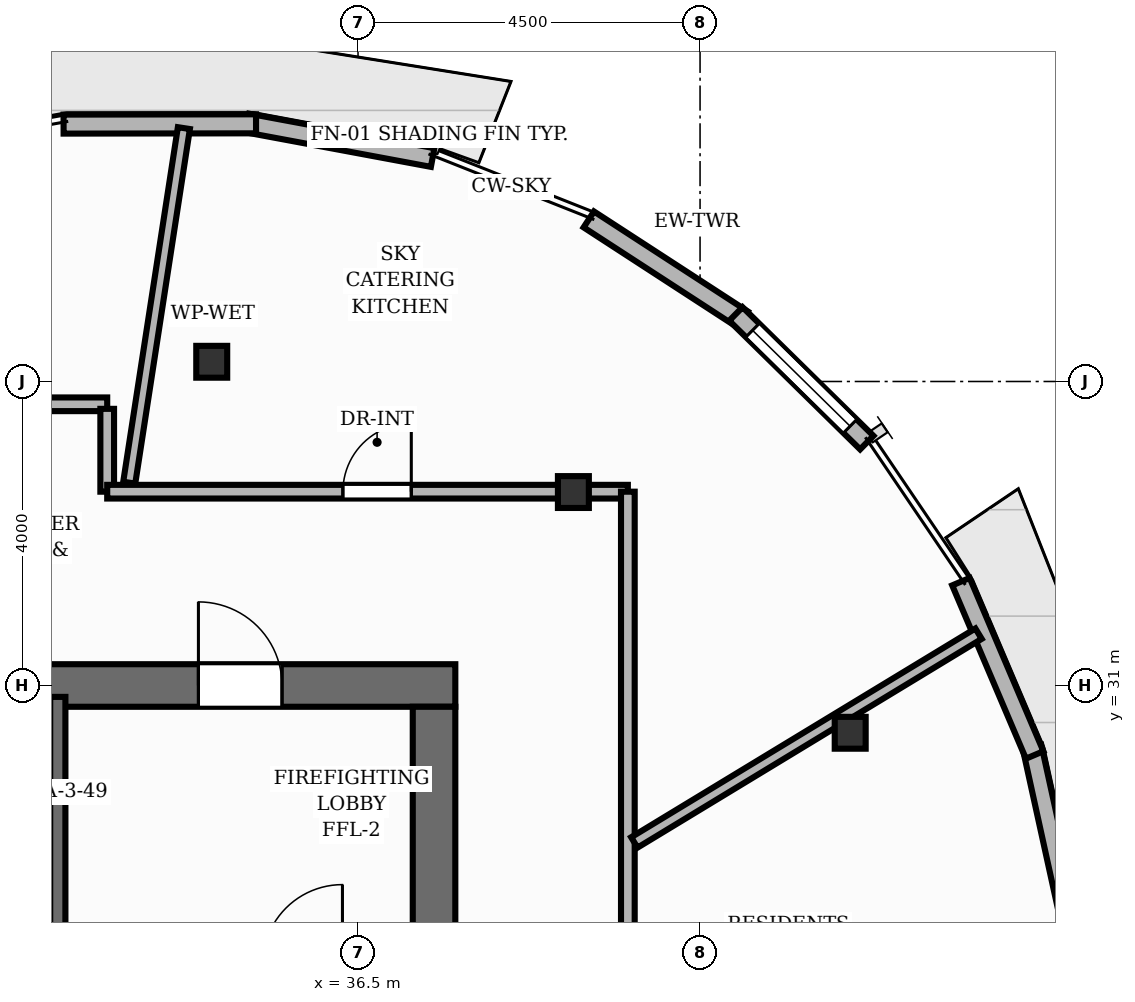
"""IFC4 building model, lengths in metres.
Left out: names, types, materials, properties, quantities, classifications, styles, units other than length and angle.
Written with IfcOpenShell. Run it as: python <this file> out.ifc"""

import sys

from ifc_helpers import new_model, si_unit, direction, frame, frame_2d, origin, origin_2d, place, context, subcontext, project, spatial, rectangle, i_section, extrude, element, fill, save


model = new_model("IFC4")
c1 = context("Model", 3, precision=1e-05, world=origin(), true_north=direction((0.0, 1.0)))
c2 = subcontext(c1, "Body", "Model", "MODEL_VIEW")
j1 = project(units=[si_unit("LENGTHUNIT", "METRE"), si_unit("PLANEANGLEUNIT", "RADIAN")], contexts=[c1])
p1 = place(None, origin())
s1 = spatial("IfcSite", under=j1, at=p1, CompositionType="ELEMENT")
p2 = place(p1, origin())
s2 = spatial("IfcBuilding", under=s1, at=p2, CompositionType="ELEMENT")
p3 = place(p2, frame((0.0, 0.0, 204.64)))
s3 = spatial("IfcBuildingStorey", under=s2, at=p3, CompositionType="ELEMENT", Elevation=204.64)
p4 = place(p3, frame((26.22, 31.0, 0.0), z_axis=(0.0, 0.0, 1.0), x_axis=(1.0, 0.0, 0.0)))
e1 = element("IfcWall", 1, at=p4, inside=s3, PredefinedType="SHEAR", context=c2, shape_type="SweptSolid", body=[
    extrude(rectangle(XDim=11.56, YDim=0.56, at=frame_2d((5.78, 0.0))), origin(), (0.0, 0.0, 1.0), 3.2),
])
p5 = place(p4, frame((8.18, 0.0, 0.0)))
e2 = element("IfcOpeningElement", 2, at=p5, cuts=e1, PredefinedType="OPENING", context=c2, shape_type="SweptSolid", body=[
    extrude(rectangle(XDim=1.1, YDim=2.15, at=frame_2d((0.55, 1.075))), frame((0.0, 0.29, 0.0), z_axis=(0.0, -1.0, 0.0), x_axis=(1.0, 0.0, 0.0)), (0.0, 0.0, 1.0), 0.58),
])
p6 = place(p4, frame((0.805, 0.0, 0.0)))
e3 = element("IfcOpeningElement", 3, at=p6, cuts=e1, PredefinedType="OPENING", context=c2, shape_type="SweptSolid", body=[
    extrude(rectangle(XDim=1.05, YDim=2.15, at=frame_2d((0.525, 1.075))), frame((0.0, 0.29, 0.0), z_axis=(0.0, -1.0, 0.0), x_axis=(1.0, 0.0, 0.0)), (0.0, 0.0, 1.0), 0.58),
])
p7 = place(p4, frame((2.555, 0.0, 0.0)))
e4 = element("IfcOpeningElement", 4, at=p7, cuts=e1, PredefinedType="OPENING", context=c2, shape_type="SweptSolid", body=[
    extrude(rectangle(XDim=1.05, YDim=2.15, at=frame_2d((0.525, 1.075))), frame((0.0, 0.29, 0.0), z_axis=(0.0, -1.0, 0.0), x_axis=(1.0, 0.0, 0.0)), (0.0, 0.0, 1.0), 0.58),
])
p8 = place(p4, frame((4.305, 0.0, 0.0)))
e5 = element("IfcOpeningElement", 5, at=p8, cuts=e1, PredefinedType="OPENING", context=c2, shape_type="SweptSolid", body=[
    extrude(rectangle(XDim=1.05, YDim=2.15, at=frame_2d((0.525, 1.075))), frame((0.0, 0.29, 0.0), z_axis=(0.0, -1.0, 0.0), x_axis=(1.0, 0.0, 0.0)), (0.0, 0.0, 1.0), 0.58),
])
p9 = place(p3, frame((37.5, 17.28, 0.0), z_axis=(0.0, 0.0, 1.0), x_axis=(0.0, 1.0, 0.0)))
e6 = element("IfcWall", 6, at=p9, inside=s3, PredefinedType="SHEAR", context=c2, shape_type="SweptSolid", body=[
    extrude(rectangle(XDim=13.44, YDim=0.56, at=frame_2d((6.72, 0.0))), origin(), (0.0, 0.0, 1.0), 3.2),
])
for number, where, z_axis, x_axis in (
    (7, (42.975, 30.378, 0.0), (0.0, 0.0, 1.0), (1.0, 0.0, 0.0)),
    (8, (39.333, 33.545, 0.0), (0.0, 0.0, 1.0), (1.0, 0.0, 0.0)),
    (9, (34.575, 35.26, 0.0), (0.0, 0.0, 1.0), (1.0, 0.0, 0.0)),
):
    element("IfcColumn", number, at=place(p3, frame(where, z_axis=z_axis, x_axis=x_axis)), inside=s3, PredefinedType="COLUMN", context=c2, shape_type="SweptSolid", body=[
        extrude(i_section(OverallWidth=0.407, OverallDepth=0.419, WebThickness=0.031, FlangeThickness=0.049, at=origin_2d()), origin(), (0.0, 0.0, 1.0), 3.2),
    ])
p10 = place(p3, frame((39.536, 37.132, 0.0), z_axis=(0.0, 0.0, 1.0), x_axis=(0.83855679862, -0.544814184368, 0.0)))
e10 = element("IfcWall", 10, at=p10, inside=s3, PredefinedType="SOLIDWALL", context=c2, shape_type="SweptSolid", body=[
    extrude(rectangle(XDim=2.415, YDim=0.25, at=frame_2d((1.207, 0.0))), origin(), (0.0, 0.0, 1.0), 2.96),
])
p11 = place(p3, frame((35.046, 38.401, 0.0), z_axis=(0.0, 0.0, 1.0), x_axis=(0.983080153293, -0.183175905079, 0.0)))
e11 = element("IfcWall", 11, at=p11, inside=s3, PredefinedType="SOLIDWALL", context=c2, shape_type="SweptSolid", body=[
    extrude(rectangle(XDim=2.478, YDim=0.25, at=frame_2d((1.239, 0.0))), origin(), (0.0, 0.0, 1.0), 2.96),
])
for number, where, z_axis, x_axis in (
    (12, (32.626, 38.386, 0.0), (0.0, 0.0, 1.0), (1.0, 0.002, 0.0)),
    (13, (45.368, 30.193, 0.0), (0.0, 0.0, 1.0), (0.215, -0.977, 0.0)),
):
    element("IfcWall", number, at=place(p3, frame(where, z_axis=z_axis, x_axis=x_axis)), inside=s3, PredefinedType="SOLIDWALL", context=c2, shape_type="SweptSolid", body=[
        extrude(rectangle(XDim=2.532, YDim=0.25, at=frame_2d((1.266, 0.0))), origin(), (0.0, 0.0, 1.0), 2.96),
    ])
p12 = place(p3, frame((44.433, 32.366, 0.0), z_axis=(0.0, 0.0, 1.0), x_axis=(0.391230346066, -0.920292788365, 0.0)))
e14 = element("IfcWall", 14, at=p12, inside=s3, PredefinedType="SOLIDWALL", context=c2, shape_type="SweptSolid", body=[
    extrude(rectangle(XDim=2.478, YDim=0.25, at=frame_2d((1.239, 0.0))), origin(), (0.0, 0.0, 1.0), 2.96),
])
p13 = place(p3, frame((41.471, 35.889, 0.0), z_axis=(0.0, 0.0, 1.0), x_axis=(0.713146654272, -0.701014871098, 0.0)))
e15 = element("IfcWall", 15, at=p13, inside=s3, PredefinedType="SOLIDWALL", context=c2, shape_type="SweptSolid", body=[
    extrude(rectangle(XDim=2.415, YDim=0.25, at=frame_2d((1.208, 0.0))), origin(), (0.0, 0.0, 1.0), 2.96),
])
p14 = place(p13, frame((0.307, 0.0, 0.85)))
e16 = element("IfcOpeningElement", 16, at=p14, cuts=e15, PredefinedType="OPENING", context=c2, shape_type="SweptSolid", body=[
    extrude(rectangle(XDim=1.8, YDim=2.0, at=frame_2d((0.9, 1.0))), frame((0.0, 0.135, 0.0), z_axis=(0.0, -1.0, 0.0), x_axis=(1.0, 0.0, 0.0)), (0.0, 0.0, 1.0), 0.27),
])
p15 = place(p3, frame((32.55, 27.35, 0.0), z_axis=(0.0, 0.0, 1.0), x_axis=(0.0, 1.0, 0.0)))
e17 = element("IfcWall", 17, at=p15, inside=s3, PredefinedType="SHEAR", context=c2, shape_type="SweptSolid", body=[
    extrude(rectangle(XDim=3.5, YDim=0.2, at=frame_2d((1.75, 0.0))), origin(), (0.0, 0.0, 1.0), 3.2),
])
p16 = place(p3, frame((30.86, 34.7, 0.0), z_axis=(0.0, 0.0, 1.0), x_axis=(1.0, 0.0, 0.0)))
e18 = element("IfcWall", 18, at=p16, inside=s3, PredefinedType="PARTITIONING", context=c2, shape_type="SweptSolid", body=[
    extrude(rectangle(XDim=2.34, YDim=0.18, at=frame_2d((1.17, 0.0))), origin(), (0.0, 0.0, 1.0), 2.955),
])
p17 = place(p3, frame((33.2, 34.64, 0.0), z_axis=(0.0, 0.0, 1.0), x_axis=(0.0, -1.0, 0.0)))
e19 = element("IfcWall", 19, at=p17, inside=s3, PredefinedType="PARTITIONING", context=c2, shape_type="SweptSolid", body=[
    extrude(rectangle(XDim=1.09, YDim=0.18, at=frame_2d((0.545, 0.0))), origin(), (0.0, 0.0, 1.0), 2.955),
])
p18 = place(p3, frame((33.2, 33.55, 0.0), z_axis=(0.0, 0.0, 1.0), x_axis=(1.0, 0.0, 0.0)))
e20 = element("IfcWall", 20, at=p18, inside=s3, PredefinedType="PARTITIONING", context=c2, shape_type="SweptSolid", body=[
    extrude(rectangle(XDim=6.85, YDim=0.18, at=frame_2d((3.425, 0.0))), origin(), (0.0, 0.0, 1.0), 2.488),
])
p19 = place(p18, frame((3.101, 0.0, 0.0)))
e21 = element("IfcOpeningElement", 21, at=p19, cuts=e20, PredefinedType="OPENING", context=c2, shape_type="SweptSolid", body=[
    extrude(rectangle(XDim=0.9, YDim=2.1, at=frame_2d((0.45, 1.05))), frame((0.0, 0.1, 0.0), z_axis=(0.0, -1.0, 0.0), x_axis=(1.0, 0.0, 0.0)), (0.0, 0.0, 1.0), 0.2),
])
p20 = place(p3, frame((40.05, 33.55, 0.0), z_axis=(0.0, 0.0, 1.0), x_axis=(0.0, -1.0, 0.0)))
e22 = element("IfcWall", 22, at=p20, inside=s3, PredefinedType="PARTITIONING", context=c2, shape_type="SweptSolid", body=[
    extrude(rectangle(XDim=19.1, YDim=0.18, at=frame_2d((9.55, 0.0))), origin(), (0.0, 0.0, 1.0), 2.955),
])
p21 = place(p20, frame((8.867, 0.0, 0.0)))
e23 = element("IfcOpeningElement", 23, at=p21, cuts=e22, PredefinedType="OPENING", context=c2, shape_type="SweptSolid", body=[
    extrude(rectangle(XDim=0.9, YDim=2.1, at=frame_2d((0.45, 1.05))), frame((0.0, 0.1, 0.0), z_axis=(0.0, -1.0, 0.0), x_axis=(1.0, 0.0, 0.0)), (0.0, 0.0, 1.0), 0.2),
])
p22 = place(p3, frame((34.209, 38.334, 0.0), z_axis=(0.0, 0.0, 1.0), x_axis=(-0.152267055073, -0.988339387022, 0.0)))
e24 = element("IfcWall", 24, at=p22, inside=s3, PredefinedType="PLUMBINGWALL", context=c2, shape_type="SweptSolid", body=[
    extrude(rectangle(XDim=4.72, YDim=0.16, at=frame_2d((2.36, 0.0))), origin(), (0.0, 0.0, 1.0), 2.955),
])
p23 = place(p3, frame((40.135, 28.935, 0.0), z_axis=(0.0, 0.0, 1.0), x_axis=(0.854997779071, 0.518631659064, 0.0)))
e25 = element("IfcWall", 25, at=p23, inside=s3, PredefinedType="PLUMBINGWALL", context=c2, shape_type="SweptSolid", body=[
    extrude(rectangle(XDim=5.296, YDim=0.16, at=frame_2d((2.648, 0.0))), origin(), (0.0, 0.0, 1.0), 2.404),
])
p24 = place(p14, origin())
e26 = element("IfcWindow", 26, at=p24, inside=s3, PartitioningType="SINGLE_PANEL", PredefinedType="WINDOW", context=c2, shape_type="SweptSolid", body=[
    extrude(rectangle(XDim=1.8, YDim=2.0, at=frame_2d((0.9, 1.0))), frame((0.0, 0.03, 0.0), z_axis=(0.0, -1.0, 0.0), x_axis=(1.0, 0.0, 0.0)), (0.0, 0.0, 1.0), 0.06),
])
fill(e16, e26)
p25 = place(p5, origin())
e27 = element("IfcDoor", 27, at=p25, inside=s3, OperationType="SINGLE_SWING_LEFT", PredefinedType="DOOR", context=c2, shape_type="SweptSolid", body=[
    extrude(rectangle(XDim=1.1, YDim=2.15, at=frame_2d((0.55, 1.075))), frame((0.0, 0.025, 0.0), z_axis=(0.0, -1.0, 0.0), x_axis=(1.0, 0.0, 0.0)), (0.0, 0.0, 1.0), 0.05),
])
fill(e2, e27)
p26 = place(p19, origin())
e28 = element("IfcDoor", 28, at=p26, inside=s3, OperationType="SINGLE_SWING_RIGHT", PredefinedType="DOOR", context=c2, shape_type="SweptSolid", body=[
    extrude(rectangle(XDim=0.9, YDim=2.1, at=frame_2d((0.45, 1.05))), frame((0.0, 0.025, 0.0), z_axis=(0.0, -1.0, 0.0), x_axis=(1.0, 0.0, 0.0)), (0.0, 0.0, 1.0), 0.05),
])
fill(e21, e28)
save(model, sys.argv[1])
